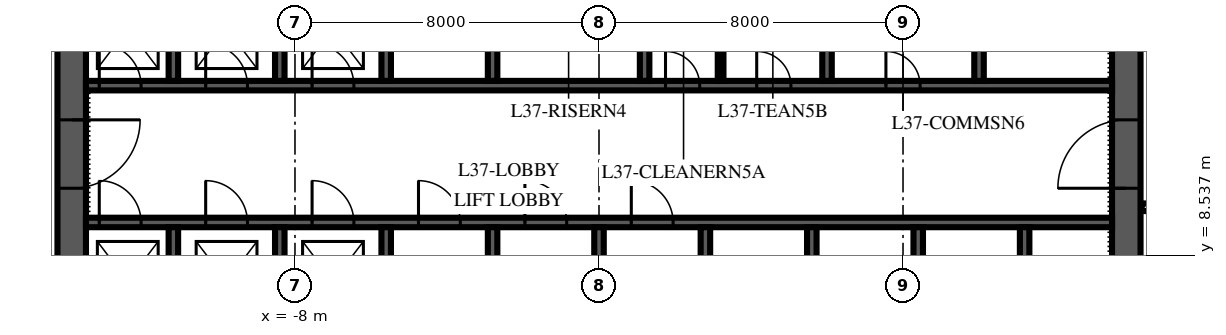
"""IFC4 building model, lengths in metres.
Left out: names, types, materials, properties, quantities, classifications, styles, units other than length and angle.
Written with IfcOpenShell. Run it as: python <this file> out.ifc"""

import sys

from ifc_helpers import new_model, si_unit, direction, frame, frame_2d, origin, place, context, subcontext, project, spatial, polyline, rectangle, outline, extrude, element, fill, save


model = new_model("IFC4")
c1 = context("Model", 3, precision=1e-05, world=origin(), true_north=direction((0.0, 1.0)))
c2 = subcontext(c1, "Body", "Model", "MODEL_VIEW")
j1 = project(units=[si_unit("LENGTHUNIT", "METRE"), si_unit("PLANEANGLEUNIT", "RADIAN")], contexts=[c1])
p1 = place(None, origin())
s1 = spatial("IfcSite", under=j1, at=p1, CompositionType="ELEMENT")
p2 = place(p1, origin())
s2 = spatial("IfcBuilding", under=s1, at=p2, CompositionType="ELEMENT")
p3 = place(p2, frame((0.0, 0.0, 163.0)))
s3 = spatial("IfcBuildingStorey", under=s2, at=p3, CompositionType="ELEMENT", Elevation=163.0)
p4 = place(p3, frame((13.875, 6.125, 0.0), z_axis=(0.0, 0.0, 1.0), x_axis=(0.0, 1.0, 0.0)))
e1 = element("IfcWall", 1, at=p4, inside=s3, PredefinedType="SHEAR", context=c2, shape_type="SweptSolid", body=[
    extrude(outline(polyline([(0.0, -0.375), (17.75, -0.375), (17.75, 0.0), (17.375, 0.0), (17.375, 0.375), (0.375, 0.375), (0.375, 0.0), (0.0, 0.0), (0.0, -0.375)])), origin(), (0.0, 0.0, 1.0), 4.0),
])
p5 = place(p4, frame((4.175, 0.0, 0.0)))
e2 = element("IfcOpeningElement", 2, at=p5, cuts=e1, PredefinedType="OPENING", context=c2, shape_type="SweptSolid", body=[
    extrude(rectangle(XDim=1.8, YDim=2.4, at=frame_2d((0.9, 1.2))), frame((0.0, 0.39, 0.0), z_axis=(0.0, -1.0, 0.0), x_axis=(1.0, 0.0, 0.0)), (0.0, 0.0, 1.0), 0.78),
])
p6 = place(p3, frame((-13.875, 23.875, 0.0), z_axis=(0.0, 0.0, 1.0), x_axis=(0.0, -1.0, 0.0)))
e3 = element("IfcWall", 3, at=p6, inside=s3, PredefinedType="SHEAR", context=c2, shape_type="SweptSolid", body=[
    extrude(outline(polyline([(0.0, -0.375), (17.75, -0.375), (17.75, 0.0), (17.375, 0.0), (17.375, 0.375), (0.375, 0.375), (0.375, 0.0), (0.0, 0.0), (0.0, -0.375)])), origin(), (0.0, 0.0, 1.0), 4.0),
])
p7 = place(p6, frame((11.775, 0.0, 0.0)))
e4 = element("IfcOpeningElement", 4, at=p7, cuts=e3, PredefinedType="OPENING", context=c2, shape_type="SweptSolid", body=[
    extrude(rectangle(XDim=1.8, YDim=2.4, at=frame_2d((0.9, 1.2))), frame((0.0, 0.39, 0.0), z_axis=(0.0, -1.0, 0.0), x_axis=(1.0, 0.0, 0.0)), (0.0, 0.0, 1.0), 0.78),
])
p8 = place(p3, frame((-13.5, 9.4, 0.0), z_axis=(0.0, 0.0, 1.0), x_axis=(1.0, 0.0, 0.0)))
e5 = element("IfcWall", 5, at=p8, inside=s3, PredefinedType="SHEAR", context=c2, shape_type="SweptSolid", body=[
    extrude(rectangle(XDim=27.0, YDim=0.25, at=frame_2d((13.5, 0.0))), origin(), (0.0, 0.0, 1.0), 4.0),
])
p9 = place(p8, frame((0.35, 0.0, 0.0)))
e6 = element("IfcOpeningElement", 6, at=p9, cuts=e5, PredefinedType="OPENING", context=c2, shape_type="SweptSolid", body=[
    extrude(rectangle(XDim=1.1, YDim=2.1, at=frame_2d((0.55, 1.05))), frame((0.0, 0.14, 0.0), z_axis=(0.0, -1.0, 0.0), x_axis=(1.0, 0.0, 0.0)), (0.0, 0.0, 1.0), 0.28),
])
p10 = place(p8, frame((3.15, 0.0, 0.0)))
e7 = element("IfcOpeningElement", 7, at=p10, cuts=e5, PredefinedType="OPENING", context=c2, shape_type="SweptSolid", body=[
    extrude(rectangle(XDim=1.1, YDim=2.1, at=frame_2d((0.55, 1.05))), frame((0.0, 0.14, 0.0), z_axis=(0.0, -1.0, 0.0), x_axis=(1.0, 0.0, 0.0)), (0.0, 0.0, 1.0), 0.28),
])
p11 = place(p8, frame((5.95, 0.0, 0.0)))
e8 = element("IfcOpeningElement", 8, at=p11, cuts=e5, PredefinedType="OPENING", context=c2, shape_type="SweptSolid", body=[
    extrude(rectangle(XDim=1.1, YDim=2.1, at=frame_2d((0.55, 1.05))), frame((0.0, 0.14, 0.0), z_axis=(0.0, -1.0, 0.0), x_axis=(1.0, 0.0, 0.0)), (0.0, 0.0, 1.0), 0.28),
])
p12 = place(p8, frame((8.75, 0.0, 0.0)))
e9 = element("IfcOpeningElement", 9, at=p12, cuts=e5, PredefinedType="OPENING", context=c2, shape_type="SweptSolid", body=[
    extrude(rectangle(XDim=1.1, YDim=2.1, at=frame_2d((0.55, 1.05))), frame((0.0, 0.14, 0.0), z_axis=(0.0, -1.0, 0.0), x_axis=(1.0, 0.0, 0.0)), (0.0, 0.0, 1.0), 0.28),
])
p13 = place(p8, frame((11.55, 0.0, 0.0)))
e10 = element("IfcOpeningElement", 10, at=p13, cuts=e5, PredefinedType="OPENING", context=c2, shape_type="SweptSolid", body=[
    extrude(rectangle(XDim=1.1, YDim=2.1, at=frame_2d((0.55, 1.05))), frame((0.0, 0.14, 0.0), z_axis=(0.0, -1.0, 0.0), x_axis=(1.0, 0.0, 0.0)), (0.0, 0.0, 1.0), 0.28),
])
p14 = place(p8, frame((14.35, 0.0, 0.0)))
e11 = element("IfcOpeningElement", 11, at=p14, cuts=e5, PredefinedType="OPENING", context=c2, shape_type="SweptSolid", body=[
    extrude(rectangle(XDim=1.1, YDim=2.1, at=frame_2d((0.55, 1.05))), frame((0.0, 0.14, 0.0), z_axis=(0.0, -1.0, 0.0), x_axis=(1.0, 0.0, 0.0)), (0.0, 0.0, 1.0), 0.28),
])
p15 = place(p3, frame((-13.5, 13.0, 0.0), z_axis=(0.0, 0.0, 1.0), x_axis=(1.0, 0.0, 0.0)))
e12 = element("IfcWall", 12, at=p15, inside=s3, PredefinedType="SHEAR", context=c2, shape_type="SweptSolid", body=[
    extrude(rectangle(XDim=27.0, YDim=0.25, at=frame_2d((13.5, 0.0))), origin(), (0.0, 0.0, 1.0), 4.0),
])
p16 = place(p15, frame((0.35, 0.0, 0.0)))
e13 = element("IfcOpeningElement", 13, at=p16, cuts=e12, PredefinedType="OPENING", context=c2, shape_type="SweptSolid", body=[
    extrude(rectangle(XDim=1.1, YDim=2.1, at=frame_2d((0.55, 1.05))), frame((0.0, 0.14, 0.0), z_axis=(0.0, -1.0, 0.0), x_axis=(1.0, 0.0, 0.0)), (0.0, 0.0, 1.0), 0.28),
])
p17 = place(p15, frame((3.15, 0.0, 0.0)))
e14 = element("IfcOpeningElement", 14, at=p17, cuts=e12, PredefinedType="OPENING", context=c2, shape_type="SweptSolid", body=[
    extrude(rectangle(XDim=1.1, YDim=2.1, at=frame_2d((0.55, 1.05))), frame((0.0, 0.14, 0.0), z_axis=(0.0, -1.0, 0.0), x_axis=(1.0, 0.0, 0.0)), (0.0, 0.0, 1.0), 0.28),
])
p18 = place(p15, frame((5.95, 0.0, 0.0)))
e15 = element("IfcOpeningElement", 15, at=p18, cuts=e12, PredefinedType="OPENING", context=c2, shape_type="SweptSolid", body=[
    extrude(rectangle(XDim=1.1, YDim=2.1, at=frame_2d((0.55, 1.05))), frame((0.0, 0.14, 0.0), z_axis=(0.0, -1.0, 0.0), x_axis=(1.0, 0.0, 0.0)), (0.0, 0.0, 1.0), 0.28),
])
p19 = place(p15, frame((15.25, 0.0, 0.0)))
e16 = element("IfcOpeningElement", 16, at=p19, cuts=e12, PredefinedType="OPENING", context=c2, shape_type="SweptSolid", body=[
    extrude(rectangle(XDim=0.9, YDim=2.1, at=frame_2d((0.45, 1.05))), frame((0.0, 0.14, 0.0), z_axis=(0.0, -1.0, 0.0), x_axis=(1.0, 0.0, 0.0)), (0.0, 0.0, 1.0), 0.28),
])
p20 = place(p15, frame((17.65, 0.0, 0.0)))
e17 = element("IfcOpeningElement", 17, at=p20, cuts=e12, PredefinedType="OPENING", context=c2, shape_type="SweptSolid", body=[
    extrude(rectangle(XDim=0.9, YDim=2.1, at=frame_2d((0.45, 1.05))), frame((0.0, 0.14, 0.0), z_axis=(0.0, -1.0, 0.0), x_axis=(1.0, 0.0, 0.0)), (0.0, 0.0, 1.0), 0.28),
])
p21 = place(p15, frame((21.05, 0.0, 0.0)))
e18 = element("IfcOpeningElement", 18, at=p21, cuts=e12, PredefinedType="OPENING", context=c2, shape_type="SweptSolid", body=[
    extrude(rectangle(XDim=0.9, YDim=2.1, at=frame_2d((0.45, 1.05))), frame((0.0, 0.14, 0.0), z_axis=(0.0, -1.0, 0.0), x_axis=(1.0, 0.0, 0.0)), (0.0, 0.0, 1.0), 0.28),
])
for number, where, z_axis, x_axis in (
    (19, (-11.2, 6.5, 0.0), (0.0, 0.0, 1.0), (0.0, 1.0, 0.0)),
    (20, (-8.4, 6.5, 0.0), (0.0, 0.0, 1.0), (0.0, 1.0, 0.0)),
    (21, (-5.6, 6.5, 0.0), (0.0, 0.0, 1.0), (0.0, 1.0, 0.0)),
    (22, (-2.8, 6.5, 0.0), (0.0, 0.0, 1.0), (0.0, 1.0, 0.0)),
    (23, (0.0, 6.5, 0.0), (0.0, 0.0, 1.0), (0.0, 1.0, 0.0)),
    (24, (2.8, 6.5, 0.0), (0.0, 0.0, 1.0), (0.0, 1.0, 0.0)),
    (25, (5.6, 6.5, 0.0), (0.0, 0.0, 1.0), (0.0, 1.0, 0.0)),
    (26, (8.4, 6.5, 0.0), (0.0, 0.0, 1.0), (0.0, 1.0, 0.0)),
    (27, (11.2, 6.5, 0.0), (0.0, 0.0, 1.0), (0.0, 1.0, 0.0)),
):
    element("IfcWall", number, at=place(p3, frame(where, z_axis=z_axis, x_axis=x_axis)), inside=s3, PredefinedType="SHEAR", context=c2, shape_type="SweptSolid", body=[
        extrude(rectangle(XDim=2.775, YDim=0.25, at=frame_2d((1.387, 0.0))), origin(), (0.0, 0.0, 1.0), 4.0),
    ])
for number, where, z_axis, x_axis in (
    (28, (-11.2, 13.125, 0.0), (0.0, 0.0, 1.0), (0.0, 1.0, 0.0)),
    (29, (-8.4, 13.125, 0.0), (0.0, 0.0, 1.0), (0.0, 1.0, 0.0)),
    (30, (-5.6, 13.125, 0.0), (0.0, 0.0, 1.0), (0.0, 1.0, 0.0)),
    (31, (-2.8, 13.125, 0.0), (0.0, 0.0, 1.0), (0.0, 1.0, 0.0)),
    (32, (1.2, 13.125, 0.0), (0.0, 0.0, 1.0), (0.0, 1.0, 0.0)),
    (33, (6.0, 13.125, 0.0), (0.0, 0.0, 1.0), (0.0, 1.0, 0.0)),
    (34, (10.0, 13.125, 0.0), (0.0, 0.0, 1.0), (0.0, 1.0, 0.0)),
):
    element("IfcWall", number, at=place(p3, frame(where, z_axis=z_axis, x_axis=x_axis)), inside=s3, PredefinedType="SHEAR", context=c2, shape_type="SweptSolid", body=[
        extrude(rectangle(XDim=2.75, YDim=0.25, at=frame_2d((1.375, 0.0))), origin(), (0.0, 0.0, 1.0), 4.0),
    ])
p22 = place(p3, frame((3.2, 13.125, 0.0), z_axis=(0.0, 0.0, 1.0), x_axis=(0.0, 1.0, 0.0)))
e35 = element("IfcWall", 35, at=p22, inside=s3, PredefinedType="PARTITIONING", context=c2, shape_type="SweptSolid", body=[
    extrude(rectangle(XDim=2.75, YDim=0.15, at=frame_2d((1.375, 0.0))), origin(), (0.0, 0.0, 1.0), 3.85),
])
p23 = place(p3, frame((14.28, 9.8, 0.0), z_axis=(0.0, 0.0, 1.0), x_axis=(1.0, 0.0, 0.0)))
e36 = element("IfcWall", 36, at=p23, inside=s3, PredefinedType="PARTITIONING", context=c2, shape_type="SweptSolid", body=[
    extrude(rectangle(XDim=2.02, YDim=0.2, at=frame_2d((1.01, 0.0))), origin(), (0.0, 0.0, 1.0), 3.75),
])
p24 = place(p5, origin())
e37 = element("IfcDoor", 37, at=p24, inside=s3, OperationType="DOUBLE_DOOR_SINGLE_SWING", PredefinedType="DOOR", context=c2, shape_type="SweptSolid", body=[
    extrude(rectangle(XDim=1.8, YDim=2.4, at=frame_2d((0.9, 1.2))), frame((0.0, 0.375, 0.0), z_axis=(0.0, -1.0, 0.0), x_axis=(1.0, 0.0, 0.0)), (0.0, 0.0, 1.0), 0.75),
])
fill(e2, e37)
p25 = place(p7, origin())
e38 = element("IfcDoor", 38, at=p25, inside=s3, OperationType="DOUBLE_DOOR_SINGLE_SWING", PredefinedType="DOOR", context=c2, shape_type="SweptSolid", body=[
    extrude(rectangle(XDim=1.8, YDim=2.4, at=frame_2d((0.9, 1.2))), frame((0.0, 0.375, 0.0), z_axis=(0.0, -1.0, 0.0), x_axis=(1.0, 0.0, 0.0)), (0.0, 0.0, 1.0), 0.75),
])
fill(e4, e38)
p26 = place(p9, origin())
e39 = element("IfcDoor", 39, at=p26, inside=s3, OperationType="SLIDING_TO_LEFT", PredefinedType="DOOR", context=c2, shape_type="SweptSolid", body=[
    extrude(rectangle(XDim=1.1, YDim=2.1, at=frame_2d((0.55, 1.05))), frame((0.0, 0.125, 0.0), z_axis=(0.0, -1.0, 0.0), x_axis=(1.0, 0.0, 0.0)), (0.0, 0.0, 1.0), 0.25),
])
fill(e6, e39)
p27 = place(p10, origin())
e40 = element("IfcDoor", 40, at=p27, inside=s3, OperationType="SLIDING_TO_LEFT", PredefinedType="DOOR", context=c2, shape_type="SweptSolid", body=[
    extrude(rectangle(XDim=1.1, YDim=2.1, at=frame_2d((0.55, 1.05))), frame((0.0, 0.125, 0.0), z_axis=(0.0, -1.0, 0.0), x_axis=(1.0, 0.0, 0.0)), (0.0, 0.0, 1.0), 0.25),
])
fill(e7, e40)
p28 = place(p11, origin())
e41 = element("IfcDoor", 41, at=p28, inside=s3, OperationType="SLIDING_TO_LEFT", PredefinedType="DOOR", context=c2, shape_type="SweptSolid", body=[
    extrude(rectangle(XDim=1.1, YDim=2.1, at=frame_2d((0.55, 1.05))), frame((0.0, 0.125, 0.0), z_axis=(0.0, -1.0, 0.0), x_axis=(1.0, 0.0, 0.0)), (0.0, 0.0, 1.0), 0.25),
])
fill(e8, e41)
p29 = place(p16, origin())
e42 = element("IfcDoor", 42, at=p29, inside=s3, OperationType="SLIDING_TO_LEFT", PredefinedType="DOOR", context=c2, shape_type="SweptSolid", body=[
    extrude(rectangle(XDim=1.1, YDim=2.1, at=frame_2d((0.55, 1.05))), frame((0.0, 0.125, 0.0), z_axis=(0.0, -1.0, 0.0), x_axis=(1.0, 0.0, 0.0)), (0.0, 0.0, 1.0), 0.25),
])
fill(e13, e42)
p30 = place(p17, origin())
e43 = element("IfcDoor", 43, at=p30, inside=s3, OperationType="SLIDING_TO_LEFT", PredefinedType="DOOR", context=c2, shape_type="SweptSolid", body=[
    extrude(rectangle(XDim=1.1, YDim=2.1, at=frame_2d((0.55, 1.05))), frame((0.0, 0.125, 0.0), z_axis=(0.0, -1.0, 0.0), x_axis=(1.0, 0.0, 0.0)), (0.0, 0.0, 1.0), 0.25),
])
fill(e14, e43)
p31 = place(p18, origin())
e44 = element("IfcDoor", 44, at=p31, inside=s3, OperationType="SLIDING_TO_LEFT", PredefinedType="DOOR", context=c2, shape_type="SweptSolid", body=[
    extrude(rectangle(XDim=1.1, YDim=2.1, at=frame_2d((0.55, 1.05))), frame((0.0, 0.125, 0.0), z_axis=(0.0, -1.0, 0.0), x_axis=(1.0, 0.0, 0.0)), (0.0, 0.0, 1.0), 0.25),
])
fill(e15, e44)
p32 = place(p12, origin())
e45 = element("IfcDoor", 45, at=p32, inside=s3, OperationType="SLIDING_TO_LEFT", PredefinedType="DOOR", context=c2, shape_type="SweptSolid", body=[
    extrude(rectangle(XDim=1.1, YDim=2.1, at=frame_2d((0.55, 1.05))), frame((0.0, 0.125, 0.0), z_axis=(0.0, -1.0, 0.0), x_axis=(1.0, 0.0, 0.0)), (0.0, 0.0, 1.0), 0.25),
])
fill(e9, e45)
p33 = place(p13, origin())
e46 = element("IfcDoor", 46, at=p33, inside=s3, OperationType="SLIDING_TO_LEFT", PredefinedType="DOOR", context=c2, shape_type="SweptSolid", body=[
    extrude(rectangle(XDim=1.1, YDim=2.1, at=frame_2d((0.55, 1.05))), frame((0.0, 0.125, 0.0), z_axis=(0.0, -1.0, 0.0), x_axis=(1.0, 0.0, 0.0)), (0.0, 0.0, 1.0), 0.25),
])
fill(e10, e46)
p34 = place(p14, origin())
e47 = element("IfcDoor", 47, at=p34, inside=s3, OperationType="SLIDING_TO_LEFT", PredefinedType="DOOR", context=c2, shape_type="SweptSolid", body=[
    extrude(rectangle(XDim=1.1, YDim=2.1, at=frame_2d((0.55, 1.05))), frame((0.0, 0.125, 0.0), z_axis=(0.0, -1.0, 0.0), x_axis=(1.0, 0.0, 0.0)), (0.0, 0.0, 1.0), 0.25),
])
fill(e11, e47)
p35 = place(p19, origin())
e48 = element("IfcDoor", 48, at=p35, inside=s3, OperationType="SINGLE_SWING_LEFT", PredefinedType="DOOR", context=c2, shape_type="SweptSolid", body=[
    extrude(rectangle(XDim=0.9, YDim=2.1, at=frame_2d((0.45, 1.05))), frame((0.0, 0.125, 0.0), z_axis=(0.0, -1.0, 0.0), x_axis=(1.0, 0.0, 0.0)), (0.0, 0.0, 1.0), 0.25),
])
fill(e16, e48)
p36 = place(p20, origin())
e49 = element("IfcDoor", 49, at=p36, inside=s3, OperationType="SINGLE_SWING_LEFT", PredefinedType="DOOR", context=c2, shape_type="SweptSolid", body=[
    extrude(rectangle(XDim=0.9, YDim=2.1, at=frame_2d((0.45, 1.05))), frame((0.0, 0.125, 0.0), z_axis=(0.0, -1.0, 0.0), x_axis=(1.0, 0.0, 0.0)), (0.0, 0.0, 1.0), 0.25),
])
fill(e17, e49)
p37 = place(p21, origin())
e50 = element("IfcDoor", 50, at=p37, inside=s3, OperationType="SINGLE_SWING_LEFT", PredefinedType="DOOR", context=c2, shape_type="SweptSolid", body=[
    extrude(rectangle(XDim=0.9, YDim=2.1, at=frame_2d((0.45, 1.05))), frame((0.0, 0.125, 0.0), z_axis=(0.0, -1.0, 0.0), x_axis=(1.0, 0.0, 0.0)), (0.0, 0.0, 1.0), 0.25),
])
fill(e18, e50)
save(model, sys.argv[1])
